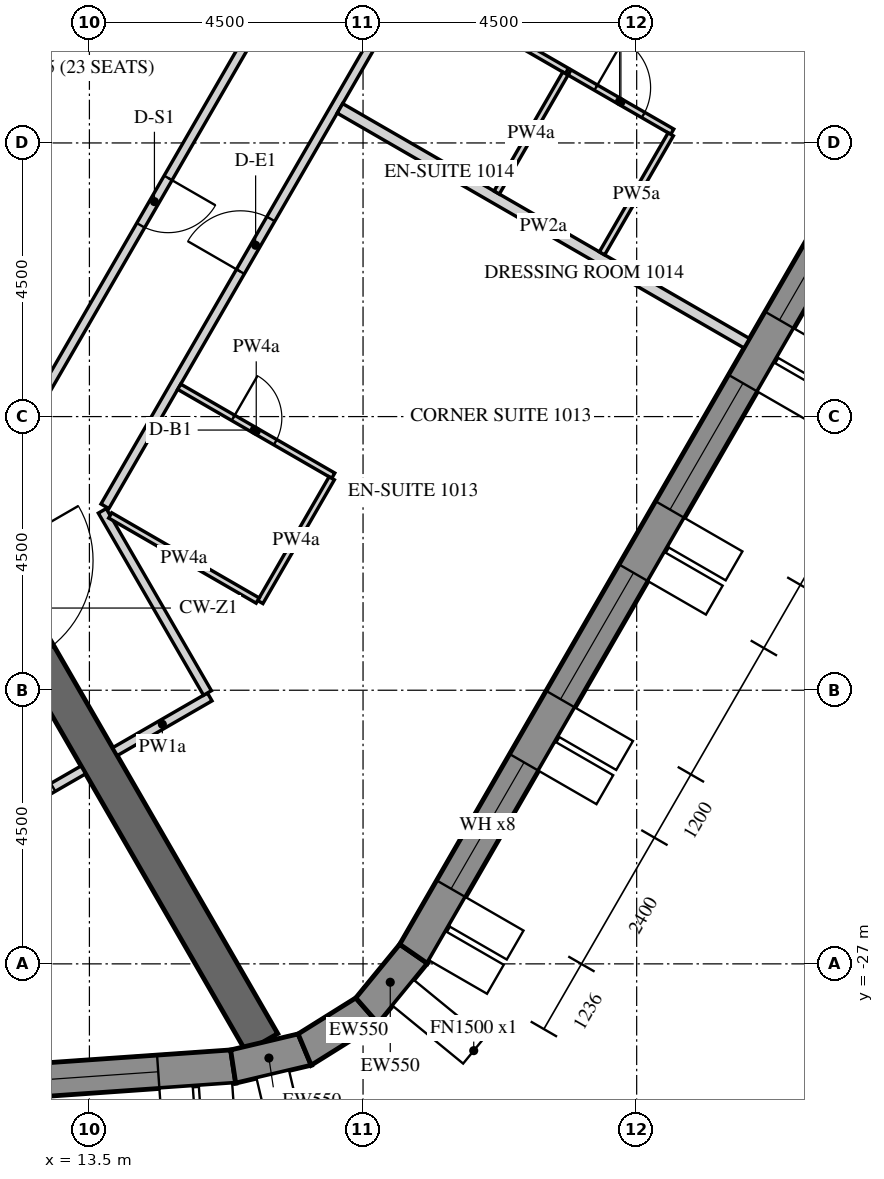
"""IFC4 building model, lengths in metres.
Left out: names, types, materials, properties, quantities, classifications, styles, units other than length and angle.
Written with IfcOpenShell. Run it as: python <this file> out.ifc"""

import sys

from ifc_helpers import new_model, si_unit, direction, frame, frame_2d, origin, place, context, subcontext, project, spatial, polyline, rectangle, outline, extrude, element, fill, save


model = new_model("IFC4")
c1 = context("Model", 3, precision=1e-05, world=origin(), true_north=direction((0.0, 1.0)))
c2 = subcontext(c1, "Body", "Model", "MODEL_VIEW")
j1 = project(units=[si_unit("LENGTHUNIT", "METRE"), si_unit("PLANEANGLEUNIT", "RADIAN")], contexts=[c1])
p1 = place(None, origin())
s1 = spatial("IfcSite", under=j1, at=p1, CompositionType="ELEMENT")
p2 = place(p1, origin())
s2 = spatial("IfcBuilding", under=s1, at=p2, CompositionType="ELEMENT")
p3 = place(p2, frame((0.0, 0.0, 135.0)))
s3 = spatial("IfcBuildingStorey", under=s2, at=p3, CompositionType="ELEMENT", Elevation=135.0)
p4 = place(p3, frame((-14.134, -30.786, -0.15), z_axis=(0.0, 0.0, 1.0), x_axis=(0.997564037441, 0.069756657061, 0.0)))
e1 = element("IfcWall", 1, at=p4, inside=s3, PredefinedType="SOLIDWALL", context=c2, shape_type="SweptSolid", body=[
    extrude(outline(polyline([(-0.026, -0.275), (30.094, -0.275), (30.049, 0.275), (0.026, 0.275), (-0.026, -0.275)])), origin(), (0.0, 0.0, 1.0), 3.9),
])
p5 = place(p4, frame((1.236, 0.0, 1.05)))
e2 = element("IfcOpeningElement", 2, at=p5, cuts=e1, PredefinedType="OPENING", context=c2, shape_type="SweptSolid", body=[
    extrude(rectangle(XDim=2.4, YDim=2.4, at=frame_2d((1.2, 1.2))), frame((0.0, 0.285, 0.0), z_axis=(0.0, -1.0, 0.0), x_axis=(1.0, 0.0, 0.0)), (0.0, 0.0, 1.0), 0.57),
])
p6 = place(p4, frame((4.835, 0.0, 1.05)))
e3 = element("IfcOpeningElement", 3, at=p6, cuts=e1, PredefinedType="OPENING", context=c2, shape_type="SweptSolid", body=[
    extrude(rectangle(XDim=2.4, YDim=2.4, at=frame_2d((1.2, 1.2))), frame((0.0, 0.285, 0.0), z_axis=(0.0, -1.0, 0.0), x_axis=(1.0, 0.0, 0.0)), (0.0, 0.0, 1.0), 0.57),
])
p7 = place(p4, frame((8.436, 0.0, 1.05)))
e4 = element("IfcOpeningElement", 4, at=p7, cuts=e1, PredefinedType="OPENING", context=c2, shape_type="SweptSolid", body=[
    extrude(rectangle(XDim=2.4, YDim=2.4, at=frame_2d((1.2, 1.2))), frame((0.0, 0.285, 0.0), z_axis=(0.0, -1.0, 0.0), x_axis=(1.0, 0.0, 0.0)), (0.0, 0.0, 1.0), 0.57),
])
p8 = place(p4, frame((12.035, 0.0, 1.05)))
e5 = element("IfcOpeningElement", 5, at=p8, cuts=e1, PredefinedType="OPENING", context=c2, shape_type="SweptSolid", body=[
    extrude(rectangle(XDim=2.4, YDim=2.4, at=frame_2d((1.2, 1.2))), frame((0.0, 0.285, 0.0), z_axis=(0.0, -1.0, 0.0), x_axis=(1.0, 0.0, 0.0)), (0.0, 0.0, 1.0), 0.57),
])
p9 = place(p4, frame((15.635, 0.0, 1.05)))
e6 = element("IfcOpeningElement", 6, at=p9, cuts=e1, PredefinedType="OPENING", context=c2, shape_type="SweptSolid", body=[
    extrude(rectangle(XDim=2.4, YDim=2.4, at=frame_2d((1.2, 1.2))), frame((0.0, 0.285, 0.0), z_axis=(0.0, -1.0, 0.0), x_axis=(1.0, 0.0, 0.0)), (0.0, 0.0, 1.0), 0.57),
])
p10 = place(p4, frame((19.236, 0.0, 1.05)))
e7 = element("IfcOpeningElement", 7, at=p10, cuts=e1, PredefinedType="OPENING", context=c2, shape_type="SweptSolid", body=[
    extrude(rectangle(XDim=2.4, YDim=2.4, at=frame_2d((1.2, 1.2))), frame((0.0, 0.285, 0.0), z_axis=(0.0, -1.0, 0.0), x_axis=(1.0, 0.0, 0.0)), (0.0, 0.0, 1.0), 0.57),
])
p11 = place(p4, frame((22.835, 0.0, 1.05)))
e8 = element("IfcOpeningElement", 8, at=p11, cuts=e1, PredefinedType="OPENING", context=c2, shape_type="SweptSolid", body=[
    extrude(rectangle(XDim=2.4, YDim=2.4, at=frame_2d((1.2, 1.2))), frame((0.0, 0.285, 0.0), z_axis=(0.0, -1.0, 0.0), x_axis=(1.0, 0.0, 0.0)), (0.0, 0.0, 1.0), 0.57),
])
p12 = place(p4, frame((26.436, 0.0, 1.05)))
e9 = element("IfcOpeningElement", 9, at=p12, cuts=e1, PredefinedType="OPENING", context=c2, shape_type="SweptSolid", body=[
    extrude(rectangle(XDim=2.4, YDim=2.4, at=frame_2d((1.2, 1.2))), frame((0.0, 0.285, 0.0), z_axis=(0.0, -1.0, 0.0), x_axis=(1.0, 0.0, 0.0)), (0.0, 0.0, 1.0), 0.57),
])
p13 = place(p3, frame((15.864, -28.688, -0.15), z_axis=(0.0, 0.0, 1.0), x_axis=(0.973063591128, 0.230536868247, 0.0)))
e10 = element("IfcWall", 10, at=p13, inside=s3, PredefinedType="SOLIDWALL", context=c2, shape_type="SweptSolid", body=[
    extrude(outline(polyline([(-0.022, -0.275), (1.253, -0.275), (1.163, 0.275), (0.022, 0.275), (-0.022, -0.275)])), origin(), (0.0, 0.0, 1.0), 3.9),
])
p14 = place(p3, frame((17.04, -28.41, -0.15), z_axis=(0.0, 0.0, 1.0), x_axis=(0.847952888306, 0.530071598195, 0.0)))
e11 = element("IfcWall", 11, at=p14, inside=s3, PredefinedType="SOLIDWALL", context=c2, shape_type="SweptSolid", body=[
    extrude(outline(polyline([(-0.045, -0.275), (1.253, -0.275), (1.163, 0.275), (0.045, 0.275), (-0.045, -0.275)])), origin(), (0.0, 0.0, 1.0), 3.9),
])
p15 = place(p3, frame((18.064, -27.769, -0.15), z_axis=(0.0, 0.0, 1.0), x_axis=(0.633842757806, 0.773461930787, 0.0)))
e12 = element("IfcWall", 12, at=p15, inside=s3, PredefinedType="SOLIDWALL", context=c2, shape_type="SweptSolid", body=[
    extrude(outline(polyline([(-0.045, -0.275), (1.231, -0.275), (1.186, 0.275), (0.045, 0.275), (-0.045, -0.275)])), origin(), (0.0, 0.0, 1.0), 3.9),
])
p16 = place(p3, frame((18.83, -26.835, -0.15), z_axis=(0.0, 0.0, 1.0), x_axis=(0.500003800416, 0.866023209602, 0.0)))
e13 = element("IfcWall", 13, at=p16, inside=s3, PredefinedType="SOLIDWALL", context=c2, shape_type="SweptSolid", body=[
    extrude(outline(polyline([(-0.022, -0.275), (30.097, -0.275), (30.045, 0.275), (0.022, 0.275), (-0.022, -0.275)])), origin(), (0.0, 0.0, 1.0), 3.9),
])
p17 = place(p16, frame((1.236, 0.0, 1.05)))
e14 = element("IfcOpeningElement", 14, at=p17, cuts=e13, PredefinedType="OPENING", context=c2, shape_type="SweptSolid", body=[
    extrude(rectangle(XDim=2.4, YDim=2.4, at=frame_2d((1.2, 1.2))), frame((0.0, 0.285, 0.0), z_axis=(0.0, -1.0, 0.0), x_axis=(1.0, 0.0, 0.0)), (0.0, 0.0, 1.0), 0.57),
])
p18 = place(p16, frame((4.835, 0.0, 1.05)))
e15 = element("IfcOpeningElement", 15, at=p18, cuts=e13, PredefinedType="OPENING", context=c2, shape_type="SweptSolid", body=[
    extrude(rectangle(XDim=2.4, YDim=2.4, at=frame_2d((1.2, 1.2))), frame((0.0, 0.285, 0.0), z_axis=(0.0, -1.0, 0.0), x_axis=(1.0, 0.0, 0.0)), (0.0, 0.0, 1.0), 0.57),
])
p19 = place(p16, frame((8.436, 0.0, 1.05)))
e16 = element("IfcOpeningElement", 16, at=p19, cuts=e13, PredefinedType="OPENING", context=c2, shape_type="SweptSolid", body=[
    extrude(rectangle(XDim=2.4, YDim=2.4, at=frame_2d((1.2, 1.2))), frame((0.0, 0.285, 0.0), z_axis=(0.0, -1.0, 0.0), x_axis=(1.0, 0.0, 0.0)), (0.0, 0.0, 1.0), 0.57),
])
p20 = place(p16, frame((12.035, 0.0, 1.05)))
e17 = element("IfcOpeningElement", 17, at=p20, cuts=e13, PredefinedType="OPENING", context=c2, shape_type="SweptSolid", body=[
    extrude(rectangle(XDim=2.4, YDim=2.4, at=frame_2d((1.2, 1.2))), frame((0.0, 0.285, 0.0), z_axis=(0.0, -1.0, 0.0), x_axis=(1.0, 0.0, 0.0)), (0.0, 0.0, 1.0), 0.57),
])
p21 = place(p16, frame((15.635, 0.0, 1.05)))
e18 = element("IfcOpeningElement", 18, at=p21, cuts=e13, PredefinedType="OPENING", context=c2, shape_type="SweptSolid", body=[
    extrude(rectangle(XDim=2.4, YDim=2.4, at=frame_2d((1.2, 1.2))), frame((0.0, 0.285, 0.0), z_axis=(0.0, -1.0, 0.0), x_axis=(1.0, 0.0, 0.0)), (0.0, 0.0, 1.0), 0.57),
])
p22 = place(p16, frame((19.236, 0.0, 1.05)))
e19 = element("IfcOpeningElement", 19, at=p22, cuts=e13, PredefinedType="OPENING", context=c2, shape_type="SweptSolid", body=[
    extrude(rectangle(XDim=2.4, YDim=2.4, at=frame_2d((1.2, 1.2))), frame((0.0, 0.285, 0.0), z_axis=(0.0, -1.0, 0.0), x_axis=(1.0, 0.0, 0.0)), (0.0, 0.0, 1.0), 0.57),
])
p23 = place(p16, frame((22.835, 0.0, 1.05)))
e20 = element("IfcOpeningElement", 20, at=p23, cuts=e13, PredefinedType="OPENING", context=c2, shape_type="SweptSolid", body=[
    extrude(rectangle(XDim=2.4, YDim=2.4, at=frame_2d((1.2, 1.2))), frame((0.0, 0.285, 0.0), z_axis=(0.0, -1.0, 0.0), x_axis=(1.0, 0.0, 0.0)), (0.0, 0.0, 1.0), 0.57),
])
p24 = place(p16, frame((26.436, 0.0, 1.05)))
e21 = element("IfcOpeningElement", 21, at=p24, cuts=e13, PredefinedType="OPENING", context=c2, shape_type="SweptSolid", body=[
    extrude(rectangle(XDim=2.4, YDim=2.4, at=frame_2d((1.2, 1.2))), frame((0.0, 0.285, 0.0), z_axis=(0.0, -1.0, 0.0), x_axis=(1.0, 0.0, 0.0)), (0.0, 0.0, 1.0), 0.57),
])
p25 = place(p3, frame((7.91, -13.7, -0.15), z_axis=(0.0, 0.0, 1.0), x_axis=(0.499999880136, 0.866025472988, 0.0)))
e22 = element("IfcWall", 22, at=p25, inside=s3, PredefinedType="SHEAR", context=c2, shape_type="SweptSolid", body=[
    extrude(outline(polyline([(-0.173, -0.3), (15.993, -0.3), (15.646, 0.3), (0.173, 0.3), (-0.173, -0.3)])), origin(), (0.0, 0.0, 1.0), 3.9),
])
p26 = place(p25, frame((7.039, 0.0, 0.15)))
e23 = element("IfcOpeningElement", 23, at=p26, cuts=e22, PredefinedType="OPENING", context=c2, shape_type="SweptSolid", body=[
    extrude(rectangle(XDim=1.8, YDim=2.4, at=frame_2d((0.9, 1.2))), frame((0.0, 0.31, 0.0), z_axis=(0.0, -1.0, 0.0), x_axis=(1.0, 0.0, 0.0)), (0.0, 0.0, 1.0), 0.62),
])
p27 = place(p3, frame((8.083, -14.0, -0.15), z_axis=(0.0, 0.0, 1.0), x_axis=(0.499997680643, -0.866026742862, 0.0)))
e24 = element("IfcWall", 24, at=p27, inside=s3, PredefinedType="SHEAR", context=c2, shape_type="SweptSolid", body=[
    extrude(rectangle(XDim=16.509, YDim=0.6, at=frame_2d((8.254, 0.0))), origin(), (0.0, 0.0, 1.0), 3.9),
])
p28 = place(p27, frame((7.354, 0.0, 0.15)))
e25 = element("IfcOpeningElement", 25, at=p28, cuts=e24, PredefinedType="OPENING", context=c2, shape_type="SweptSolid", body=[
    extrude(rectangle(XDim=1.8, YDim=2.4, at=frame_2d((0.9, 1.2))), frame((0.0, 0.31, 0.0), z_axis=(0.0, -1.0, 0.0), x_axis=(1.0, 0.0, 0.0)), (0.0, 0.0, 1.0), 0.62),
])
p29 = place(p3, frame((11.906, -24.673, 0.0), z_axis=(0.0, 0.0, 1.0), x_axis=(0.866013532718, 0.500020560727, 0.0)))
e26 = element("IfcWall", 26, at=p29, inside=s3, PredefinedType="PARTITIONING", context=c2, shape_type="SweptSolid", body=[
    extrude(rectangle(XDim=1.725, YDim=0.15, at=frame_2d((0.863, 0.0))), origin(), (0.0, 0.0, 1.0), 2.838),
])
p30 = place(p29, frame((0.15, 0.0, 0.0)))
e27 = element("IfcOpeningElement", 27, at=p30, cuts=e26, PredefinedType="OPENING", context=c2, shape_type="SweptSolid", body=[
    extrude(rectangle(XDim=1.0, YDim=2.1, at=frame_2d((0.5, 1.05))), frame((0.0, 0.085, 0.0), z_axis=(0.0, -1.0, 0.0), x_axis=(1.0, 0.0, 0.0)), (0.0, 0.0, 1.0), 0.17),
])
p31 = place(p3, frame((13.92, -23.51, 0.0), z_axis=(0.0, 0.0, 1.0), x_axis=(0.866047807691, 0.499961193289, 0.0)))
e28 = element("IfcWall", 28, at=p31, inside=s3, PredefinedType="PARTITIONING", context=c2, shape_type="SweptSolid", body=[
    extrude(rectangle(XDim=1.8, YDim=0.15, at=frame_2d((0.9, 0.0))), origin(), (0.0, 0.0, 1.0), 2.838),
])
p32 = place(p3, frame((15.441, -22.545, 0.0), z_axis=(0.0, 0.0, 1.0), x_axis=(-0.500003541824, 0.866023358902, 0.0)))
e29 = element("IfcWall", 29, at=p32, inside=s3, PredefinedType="PARTITIONING", context=c2, shape_type="SweptSolid", body=[
    extrude(rectangle(XDim=3.458, YDim=0.15, at=frame_2d((1.729, 0.0))), origin(), (0.0, 0.0, 1.0), 2.838),
])
p33 = place(p3, frame((13.755, -19.475, 0.0), z_axis=(0.0, 0.0, 1.0), x_axis=(0.50000013933, 0.866025323342, 0.0)))
e30 = element("IfcWall", 30, at=p33, inside=s3, PredefinedType="PARTITIONING", context=c2, shape_type="SweptSolid", body=[
    extrude(rectangle(XDim=23.517, YDim=0.15, at=frame_2d((11.758, 0.0))), origin(), (0.0, 0.0, 1.0), 2.838),
])
p34 = place(p33, frame((4.456, 0.0, 0.0)))
e31 = element("IfcOpeningElement", 31, at=p34, cuts=e30, PredefinedType="OPENING", context=c2, shape_type="SweptSolid", body=[
    extrude(rectangle(XDim=1.0, YDim=2.1, at=frame_2d((0.5, 1.05))), frame((0.0, 0.085, 0.0), z_axis=(0.0, -1.0, 0.0), x_axis=(1.0, 0.0, 0.0)), (0.0, 0.0, 1.0), 0.17),
])
p35 = place(p33, frame((13.699, 0.0, 0.0)))
e32 = element("IfcOpeningElement", 32, at=p35, cuts=e30, PredefinedType="OPENING", context=c2, shape_type="SweptSolid", body=[
    extrude(rectangle(XDim=1.0, YDim=2.1, at=frame_2d((0.5, 1.05))), frame((0.0, 0.085, 0.0), z_axis=(0.0, -1.0, 0.0), x_axis=(1.0, 0.0, 0.0)), (0.0, 0.0, 1.0), 0.17),
])
p36 = place(p33, frame((21.658, 0.0, 0.0)))
e33 = element("IfcOpeningElement", 33, at=p36, cuts=e30, PredefinedType="OPENING", context=c2, shape_type="SweptSolid", body=[
    extrude(rectangle(XDim=1.0, YDim=2.1, at=frame_2d((0.5, 1.05))), frame((0.0, 0.085, 0.0), z_axis=(0.0, -1.0, 0.0), x_axis=(1.0, 0.0, 0.0)), (0.0, 0.0, 1.0), 0.17),
])
p37 = place(p3, frame((16.643, -10.874, 0.0), z_axis=(0.0, 0.0, 1.0), x_axis=(-0.50000192383, -0.866024293058, 0.0)))
e34 = element("IfcWall", 34, at=p37, inside=s3, PredefinedType="PARTITIONING", context=c2, shape_type="SweptSolid", body=[
    extrude(rectangle(XDim=8.293, YDim=0.15, at=frame_2d((4.146, 0.0))), origin(), (0.0, 0.0, 1.0), 2.838),
])
p38 = place(p37, frame((3.697, 0.0, 0.0)))
e35 = element("IfcOpeningElement", 35, at=p38, cuts=e34, PredefinedType="OPENING", context=c2, shape_type="SweptSolid", body=[
    extrude(rectangle(XDim=0.9, YDim=2.1, at=frame_2d((0.45, 1.05))), frame((0.0, 0.085, 0.0), z_axis=(0.0, -1.0, 0.0), x_axis=(1.0, 0.0, 0.0)), (0.0, 0.0, 1.0), 0.17),
])
p39 = place(p3, frame((14.977, -17.509, 0.0), z_axis=(0.0, 0.0, 1.0), x_axis=(0.866046596414, -0.499963291492, 0.0)))
e36 = element("IfcWall", 36, at=p39, inside=s3, PredefinedType="PARTITIONING", context=c2, shape_type="SweptSolid", body=[
    extrude(rectangle(XDim=2.925, YDim=0.1, at=frame_2d((1.462, 0.0))), origin(), (0.0, 0.0, 1.0), 2.838),
])
p40 = place(p39, frame((1.025, 0.0, 0.0)))
e37 = element("IfcOpeningElement", 37, at=p40, cuts=e36, PredefinedType="OPENING", context=c2, shape_type="SweptSolid", body=[
    extrude(rectangle(XDim=0.8, YDim=2.1, at=frame_2d((0.4, 1.05))), frame((0.0, 0.06, 0.0), z_axis=(0.0, -1.0, 0.0), x_axis=(1.0, 0.0, 0.0)), (0.0, 0.0, 1.0), 0.12),
])
p41 = place(p3, frame((17.485, -19.015, 0.0), z_axis=(0.0, 0.0, 1.0), x_axis=(-0.500016218704, -0.866016039709, 0.0)))
e38 = element("IfcWall", 38, at=p41, inside=s3, PredefinedType="PARTITIONING", context=c2, shape_type="SweptSolid", body=[
    extrude(rectangle(XDim=2.35, YDim=0.1, at=frame_2d((1.175, 0.0))), origin(), (0.0, 0.0, 1.0), 2.838),
])
p42 = place(p3, frame((16.267, -21.025, 0.0), z_axis=(0.0, 0.0, 1.0), x_axis=(-0.866034573852, 0.49998411664, 0.0)))
e39 = element("IfcWall", 39, at=p42, inside=s3, PredefinedType="PARTITIONING", context=c2, shape_type="SweptSolid", body=[
    extrude(rectangle(XDim=2.8, YDim=0.1, at=frame_2d((1.4, 0.0))), origin(), (0.0, 0.0, 1.0), 2.838),
])
p43 = place(p3, frame((24.31, -16.794, 0.0), z_axis=(0.0, 0.0, 1.0), x_axis=(-0.866027174938, 0.499996932259, 0.0)))
e40 = element("IfcWall", 40, at=p43, inside=s3, PredefinedType="PARTITIONING", context=c2, shape_type="SweptSolid", body=[
    extrude(rectangle(XDim=7.725, YDim=0.18, at=frame_2d((3.863, 0.0))), origin(), (0.0, 0.0, 1.0), 2.838),
])
p44 = place(p3, frame((18.82, -10.853, 0.0), z_axis=(0.0, 0.0, 1.0), x_axis=(0.866046596414, -0.499963291492, 0.0)))
e41 = element("IfcWall", 41, at=p44, inside=s3, PredefinedType="PARTITIONING", context=c2, shape_type="SweptSolid", body=[
    extrude(rectangle(XDim=2.925, YDim=0.1, at=frame_2d((1.462, 0.0))), origin(), (0.0, 0.0, 1.0), 2.838),
])
p45 = place(p44, frame((1.025, 0.0, 0.0)))
e42 = element("IfcOpeningElement", 42, at=p45, cuts=e41, PredefinedType="OPENING", context=c2, shape_type="SweptSolid", body=[
    extrude(rectangle(XDim=0.8, YDim=2.1, at=frame_2d((0.4, 1.05))), frame((0.0, 0.06, 0.0), z_axis=(0.0, -1.0, 0.0), x_axis=(1.0, 0.0, 0.0)), (0.0, 0.0, 1.0), 0.12),
])
p46 = place(p3, frame((21.396, -12.34, 0.0), z_axis=(0.0, 0.0, 1.0), x_axis=(0.866031321059, -0.49998975084, 0.0)))
e43 = element("IfcWall", 43, at=p46, inside=s3, PredefinedType="PARTITIONING", context=c2, shape_type="SweptSolid", body=[
    extrude(rectangle(XDim=1.95, YDim=0.1, at=frame_2d((0.975, 0.0))), origin(), (0.0, 0.0, 1.0), 2.838),
])
p47 = place(p46, frame((0.5, 0.0, 0.0)))
e44 = element("IfcOpeningElement", 44, at=p47, cuts=e43, PredefinedType="OPENING", context=c2, shape_type="SweptSolid", body=[
    extrude(rectangle(XDim=0.9, YDim=2.1, at=frame_2d((0.45, 1.05))), frame((0.0, 0.06, 0.0), z_axis=(0.0, -1.0, 0.0), x_axis=(1.0, 0.0, 0.0)), (0.0, 0.0, 1.0), 0.12),
])
for number, where, z_axis, x_axis in (
    (45, (23.06, -13.359, 0.0), (0.0, 0.0, 1.0), (-0.5, -0.866, 0.0)),
    (46, (20.198, -14.316, 0.0), (0.0, 0.0, 1.0), (0.5, 0.866, 0.0)),
):
    element("IfcWall", number, at=place(p3, frame(where, z_axis=z_axis, x_axis=x_axis)), inside=s3, PredefinedType="PARTITIONING", context=c2, shape_type="SweptSolid", body=[
        extrude(rectangle(XDim=2.26, YDim=0.1, at=frame_2d((1.13, 0.0))), origin(), (0.0, 0.0, 1.0), 2.838),
    ])
p48 = place(p12, frame((0.0, 0.205, 0.0)))
e47 = element("IfcWindow", 47, at=p48, inside=s3, PartitioningType="DOUBLE_PANEL_VERTICAL", PredefinedType="WINDOW", context=c2, shape_type="SweptSolid", body=[
    extrude(rectangle(XDim=2.4, YDim=2.4, at=frame_2d((1.2, 1.2))), frame((0.0, 0.03, 0.0), z_axis=(0.0, -1.0, 0.0), x_axis=(1.0, 0.0, 0.0)), (0.0, 0.0, 1.0), 0.06),
])
fill(e9, e47)
p49 = place(p17, frame((0.0, 0.205, 0.0)))
e48 = element("IfcWindow", 48, at=p49, inside=s3, PartitioningType="DOUBLE_PANEL_VERTICAL", PredefinedType="WINDOW", context=c2, shape_type="SweptSolid", body=[
    extrude(rectangle(XDim=2.4, YDim=2.4, at=frame_2d((1.2, 1.2))), frame((0.0, 0.03, 0.0), z_axis=(0.0, -1.0, 0.0), x_axis=(1.0, 0.0, 0.0)), (0.0, 0.0, 1.0), 0.06),
])
fill(e14, e48)
p50 = place(p18, frame((0.0, 0.205, 0.0)))
e49 = element("IfcWindow", 49, at=p50, inside=s3, PartitioningType="DOUBLE_PANEL_VERTICAL", PredefinedType="WINDOW", context=c2, shape_type="SweptSolid", body=[
    extrude(rectangle(XDim=2.4, YDim=2.4, at=frame_2d((1.2, 1.2))), frame((0.0, 0.03, 0.0), z_axis=(0.0, -1.0, 0.0), x_axis=(1.0, 0.0, 0.0)), (0.0, 0.0, 1.0), 0.06),
])
fill(e15, e49)
p51 = place(p19, frame((0.0, 0.205, 0.0)))
e50 = element("IfcWindow", 50, at=p51, inside=s3, PartitioningType="DOUBLE_PANEL_VERTICAL", PredefinedType="WINDOW", context=c2, shape_type="SweptSolid", body=[
    extrude(rectangle(XDim=2.4, YDim=2.4, at=frame_2d((1.2, 1.2))), frame((0.0, 0.03, 0.0), z_axis=(0.0, -1.0, 0.0), x_axis=(1.0, 0.0, 0.0)), (0.0, 0.0, 1.0), 0.06),
])
fill(e16, e50)
p52 = place(p20, frame((0.0, 0.205, 0.0)))
e51 = element("IfcWindow", 51, at=p52, inside=s3, PartitioningType="DOUBLE_PANEL_VERTICAL", PredefinedType="WINDOW", context=c2, shape_type="SweptSolid", body=[
    extrude(rectangle(XDim=2.4, YDim=2.4, at=frame_2d((1.2, 1.2))), frame((0.0, 0.03, 0.0), z_axis=(0.0, -1.0, 0.0), x_axis=(1.0, 0.0, 0.0)), (0.0, 0.0, 1.0), 0.06),
])
fill(e17, e51)
p53 = place(p30, origin())
e52 = element("IfcDoor", 52, at=p53, inside=s3, OperationType="SINGLE_SWING_RIGHT", PredefinedType="DOOR", context=c2, shape_type="SweptSolid", body=[
    extrude(rectangle(XDim=1.0, YDim=2.1, at=frame_2d((0.5, 1.05))), frame((0.0, 0.025, 0.0), z_axis=(0.0, -1.0, 0.0), x_axis=(1.0, 0.0, 0.0)), (0.0, 0.0, 1.0), 0.05),
])
fill(e27, e52)
p54 = place(p34, origin())
e53 = element("IfcDoor", 53, at=p54, inside=s3, OperationType="SINGLE_SWING_LEFT", PredefinedType="DOOR", context=c2, shape_type="SweptSolid", body=[
    extrude(rectangle(XDim=1.0, YDim=2.1, at=frame_2d((0.5, 1.05))), frame((0.0, 0.025, 0.0), z_axis=(0.0, -1.0, 0.0), x_axis=(1.0, 0.0, 0.0)), (0.0, 0.0, 1.0), 0.05),
])
fill(e31, e53)
p55 = place(p40, origin())
e54 = element("IfcDoor", 54, at=p55, inside=s3, OperationType="SINGLE_SWING_RIGHT", PredefinedType="DOOR", context=c2, shape_type="SweptSolid", body=[
    extrude(rectangle(XDim=0.8, YDim=2.1, at=frame_2d((0.4, 1.05))), frame((0.0, 0.025, 0.0), z_axis=(0.0, -1.0, 0.0), x_axis=(1.0, 0.0, 0.0)), (0.0, 0.0, 1.0), 0.05),
])
fill(e37, e54)
p56 = place(p47, origin())
e55 = element("IfcDoor", 55, at=p56, inside=s3, OperationType="SINGLE_SWING_RIGHT", PredefinedType="DOOR", context=c2, shape_type="SweptSolid", body=[
    extrude(rectangle(XDim=0.9, YDim=2.1, at=frame_2d((0.45, 1.05))), frame((0.0, 0.025, 0.0), z_axis=(0.0, -1.0, 0.0), x_axis=(1.0, 0.0, 0.0)), (0.0, 0.0, 1.0), 0.05),
])
fill(e44, e55)
p57 = place(p38, origin())
e56 = element("IfcDoor", 56, at=p57, inside=s3, OperationType="SINGLE_SWING_RIGHT", PredefinedType="DOOR", context=c2, shape_type="SweptSolid", body=[
    extrude(rectangle(XDim=0.9, YDim=2.1, at=frame_2d((0.45, 1.05))), frame((0.0, 0.025, 0.0), z_axis=(0.0, -1.0, 0.0), x_axis=(1.0, 0.0, 0.0)), (0.0, 0.0, 1.0), 0.05),
])
fill(e35, e56)
save(model, sys.argv[1])
